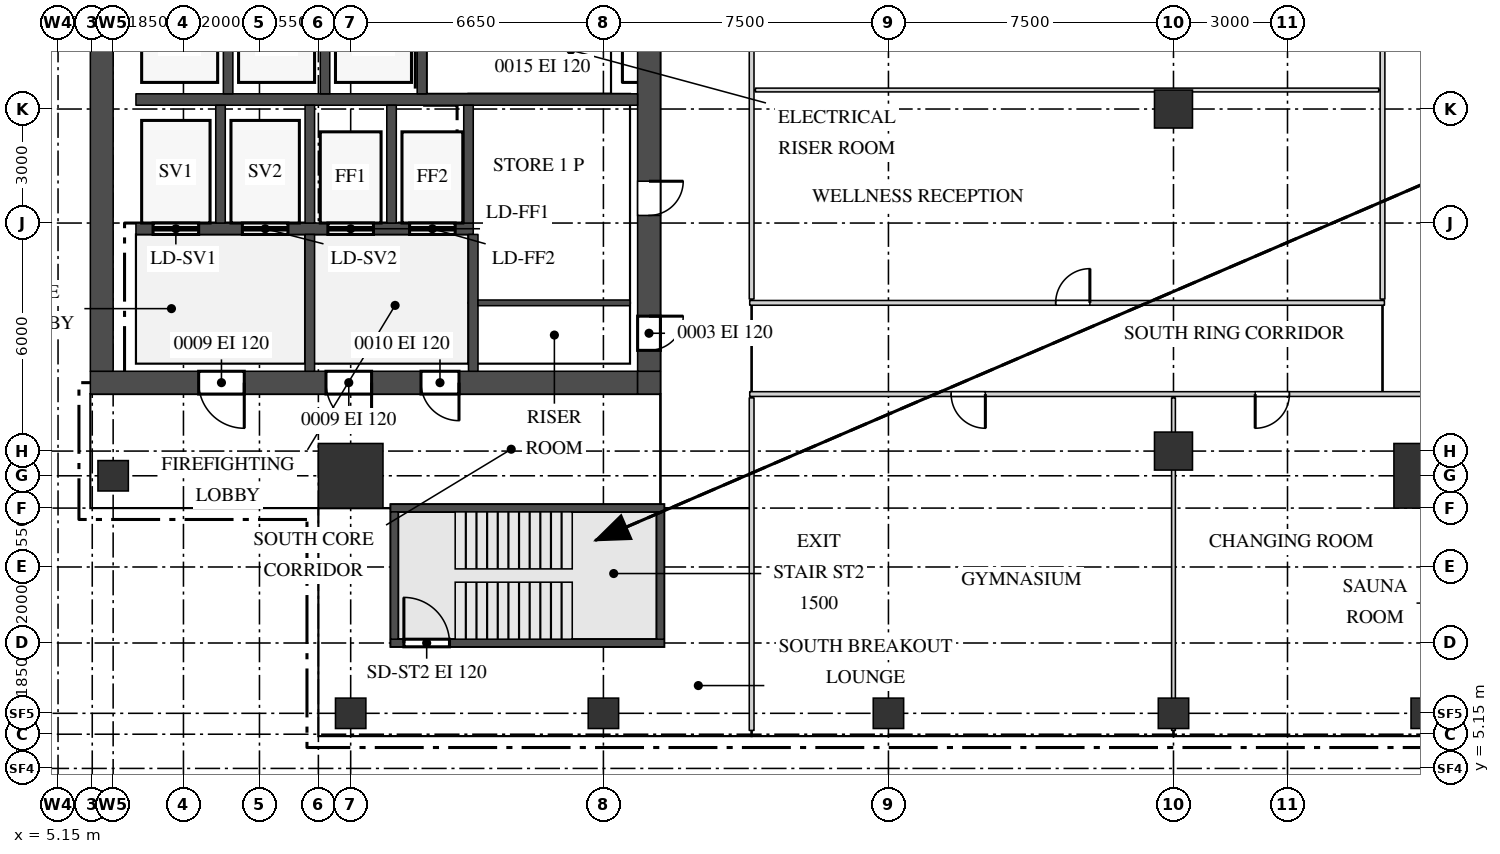
"""IFC4 building model, lengths in metres.
Left out: names, types, materials, properties, quantities, classifications, styles, units other than length and angle.
Written with IfcOpenShell. Run it as: python <this file> out.ifc"""

import sys

from ifc_helpers import new_model, si_unit, direction, frame, frame_2d, origin, origin_2d, place, context, subcontext, project, spatial, rectangle, extrude, source, transform, mapped, element, fill, save


model = new_model("IFC4")
c1 = context("Model", 3, precision=1e-05, world=origin(), true_north=direction((0.0, 1.0)))
c2 = subcontext(c1, "Body", "Model", "MODEL_VIEW")
j1 = project(units=[si_unit("LENGTHUNIT", "METRE"), si_unit("PLANEANGLEUNIT", "RADIAN")], contexts=[c1])
p1 = place(None, origin())
s1 = spatial("IfcSite", under=j1, at=p1, CompositionType="ELEMENT")
p2 = place(p1, origin())
s2 = spatial("IfcBuilding", under=s1, at=p2, CompositionType="ELEMENT")
p3 = place(p2, frame((0.0, 0.0, 298.2)))
s3 = spatial("IfcBuildingStorey", under=s2, at=p3, CompositionType="ELEMENT", Elevation=298.2)
m1 = source(origin(), c2, "Body", "SweptSolid", [
    extrude(rectangle(XDim=14.4, YDim=0.6, at=frame_2d((7.2, 0.0))), origin(), (0.0, 0.0, 1.0), 3.75),
])
p4 = place(p3, frame((6.0, 15.3, 0.0), z_axis=(0.0, 0.0, 1.0), x_axis=(1.0, 0.0, 0.0)))
e1 = element("IfcWall", 1, at=p4, inside=s3, PredefinedType="SHEAR", context=c2, shape_type="MappedRepresentation", body=[
    mapped(m1, transform((0.0, 0.0, 0.0))),
])
m2 = source(origin(), c2, "Body", "SweptSolid", [
    extrude(rectangle(XDim=1.2, YDim=2.1, at=frame_2d((0.6, 1.05))), frame((0.0, 0.31, 0.0), z_axis=(0.0, -1.0, 0.0), x_axis=(1.0, 0.0, 0.0)), (0.0, 0.0, 1.0), 0.62),
])
p5 = place(p4, frame((6.2, 0.0, 0.0)))
e2 = element("IfcOpeningElement", 2, at=p5, cuts=e1, PredefinedType="OPENING", context=c2, shape_type="MappedRepresentation", body=[
    mapped(m2, transform((0.0, 0.0, 0.0))),
])
p6 = place(p4, frame((2.85, 0.0, 0.0)))
e3 = element("IfcOpeningElement", 3, at=p6, cuts=e1, PredefinedType="OPENING", context=c2, shape_type="MappedRepresentation", body=[
    mapped(m2, transform((0.0, 0.0, 0.0))),
])
m3 = source(origin(), c2, "Body", "SweptSolid", [
    extrude(rectangle(XDim=1.0, YDim=2.1, at=frame_2d((0.5, 1.05))), frame((0.0, 0.31, 0.0), z_axis=(0.0, -1.0, 0.0), x_axis=(1.0, 0.0, 0.0)), (0.0, 0.0, 1.0), 0.62),
])
p7 = place(p4, frame((8.7, 0.0, 0.0)))
e4 = element("IfcOpeningElement", 4, at=p7, cuts=e1, PredefinedType="OPENING", context=c2, shape_type="MappedRepresentation", body=[
    mapped(m3, transform((0.0, 0.0, 0.0))),
])
m4 = source(origin(), c2, "Body", "SweptSolid", [
    extrude(rectangle(XDim=0.6, YDim=0.6, at=frame_2d((0.3, 0.0))), origin(), (0.0, 0.0, 1.0), 3.75),
])
p8 = place(p3, frame((20.4, 15.3, 0.0), z_axis=(0.0, 0.0, 1.0), x_axis=(1.0, 0.0, 0.0)))
e5 = element("IfcWall", 5, at=p8, inside=s3, PredefinedType="SHEAR", context=c2, shape_type="MappedRepresentation", body=[
    mapped(m4, transform((0.0, 0.0, 0.0))),
])
m5 = source(origin(), c2, "Body", "SweptSolid", [
    extrude(rectangle(XDim=22.8, YDim=0.6, at=frame_2d((11.4, 0.0))), origin(), (0.0, 0.0, 1.0), 3.75),
])
p9 = place(p3, frame((20.7, 15.6, 0.0), z_axis=(0.0, 0.0, 1.0), x_axis=(0.0, 1.0, 0.0)))
e6 = element("IfcWall", 6, at=p9, inside=s3, PredefinedType="SHEAR", context=c2, shape_type="MappedRepresentation", body=[
    mapped(m5, transform((0.0, 0.0, 0.0))),
])
m6 = source(origin(), c2, "Body", "SweptSolid", [
    extrude(rectangle(XDim=1.8, YDim=2.1, at=frame_2d((0.9, 1.05))), frame((0.0, 0.31, 0.0), z_axis=(0.0, -1.0, 0.0), x_axis=(1.0, 0.0, 0.0)), (0.0, 0.0, 1.0), 0.62),
])
p10 = place(p9, frame((10.9, 0.0, 0.0)))
e7 = element("IfcOpeningElement", 7, at=p10, cuts=e6, PredefinedType="OPENING", context=c2, shape_type="MappedRepresentation", body=[
    mapped(m6, transform((0.0, 0.0, 0.0))),
])
m7 = source(origin(), c2, "Body", "SweptSolid", [
    extrude(rectangle(XDim=0.9, YDim=2.1, at=frame_2d((0.45, 1.05))), frame((0.0, 0.31, 0.0), z_axis=(0.0, -1.0, 0.0), x_axis=(1.0, 0.0, 0.0)), (0.0, 0.0, 1.0), 0.62),
])
p11 = place(p9, frame((0.55, 0.0, 0.0)))
e8 = element("IfcOpeningElement", 8, at=p11, cuts=e6, PredefinedType="OPENING", context=c2, shape_type="MappedRepresentation", body=[
    mapped(m7, transform((0.0, 0.0, 0.0))),
])
p12 = place(p9, frame((4.1, 0.0, 0.0)))
e9 = element("IfcOpeningElement", 9, at=p12, cuts=e6, PredefinedType="OPENING", context=c2, shape_type="MappedRepresentation", body=[
    mapped(m7, transform((0.0, 0.0, 0.0))),
])
p13 = place(p3, frame((6.3, 15.6, 0.0), z_axis=(0.0, 0.0, 1.0), x_axis=(0.0, 1.0, 0.0)))
e10 = element("IfcWall", 10, at=p13, inside=s3, PredefinedType="SHEAR", context=c2, shape_type="MappedRepresentation", body=[
    mapped(m5, transform((0.0, 0.0, 0.0))),
])
m8 = source(origin(), c2, "Body", "SweptSolid", [
    extrude(rectangle(XDim=7.2, YDim=0.2, at=frame_2d((3.6, 0.0))), origin(), (0.0, 0.0, 1.0), 3.75),
])
p14 = place(p3, frame((13.9, 12.0, 0.0), z_axis=(0.0, 0.0, 1.0), x_axis=(1.0, 0.0, 0.0)))
e11 = element("IfcWall", 11, at=p14, inside=s3, PredefinedType="SHEAR", context=c2, shape_type="MappedRepresentation", body=[
    mapped(m8, transform((0.0, 0.0, 0.0))),
])
p15 = place(p3, frame((13.9, 8.45, 0.0), z_axis=(0.0, 0.0, 1.0), x_axis=(1.0, 0.0, 0.0)))
e12 = element("IfcWall", 12, at=p15, inside=s3, PredefinedType="SHEAR", context=c2, shape_type="MappedRepresentation", body=[
    mapped(m8, transform((0.0, 0.0, 0.0))),
])
m9 = source(origin(), c2, "Body", "SweptSolid", [
    extrude(rectangle(XDim=1.2, YDim=2.1, at=frame_2d((0.6, 1.05))), frame((0.0, 0.11, 0.0), z_axis=(0.0, -1.0, 0.0), x_axis=(1.0, 0.0, 0.0)), (0.0, 0.0, 1.0), 0.22),
])
p16 = place(p15, frame((0.35, 0.0, 0.0)))
e13 = element("IfcOpeningElement", 13, at=p16, cuts=e12, PredefinedType="OPENING", context=c2, shape_type="MappedRepresentation", body=[
    mapped(m9, transform((0.0, 0.0, 0.0))),
])
m10 = source(origin(), c2, "Body", "SweptSolid", [
    extrude(rectangle(XDim=3.35, YDim=0.2, at=frame_2d((1.675, 0.0))), origin(), (0.0, 0.0, 1.0), 3.75),
])
for number, where, z_axis, x_axis in (
    (14, (21.0, 8.55, 0.0), (0.0, 0.0, 1.0), (0.0, 1.0, 0.0)),
    (15, (14.0, 8.55, 0.0), (0.0, 0.0, 1.0), (0.0, 1.0, 0.0)),
):
    element("IfcWall", number, at=place(p3, frame(where, z_axis=z_axis, x_axis=x_axis)), inside=s3, PredefinedType="SHEAR", context=c2, shape_type="MappedRepresentation", body=[
        mapped(m10, transform((0.0, 0.0, 0.0))),
    ])
m11 = source(origin(), c2, "Body", "SweptSolid", [
    extrude(rectangle(XDim=13.2, YDim=0.3, at=frame_2d((6.6, 0.0))), origin(), (0.0, 0.0, 1.0), 3.75),
])
p17 = place(p3, frame((7.2, 22.75, 0.0), z_axis=(0.0, 0.0, 1.0), x_axis=(1.0, 0.0, 0.0)))
e16 = element("IfcWall", 16, at=p17, inside=s3, PredefinedType="STANDARD", context=c2, shape_type="MappedRepresentation", body=[
    mapped(m11, transform((0.0, 0.0, 0.0))),
])
m12 = source(origin(), c2, "Body", "SweptSolid", [
    extrude(rectangle(XDim=8.875, YDim=0.3, at=frame_2d((4.438, 0.0))), origin(), (0.0, 0.0, 1.0), 3.75),
])
p18 = place(p3, frame((7.2, 19.35, 0.0), z_axis=(0.0, 0.0, 1.0), x_axis=(1.0, 0.0, 0.0)))
e17 = element("IfcWall", 17, at=p18, inside=s3, PredefinedType="STANDARD", context=c2, shape_type="MappedRepresentation", body=[
    mapped(m12, transform((0.0, 0.0, 0.0))),
])
m13 = source(origin(), c2, "Body", "SweptSolid", [
    extrude(rectangle(XDim=1.2, YDim=2.1, at=frame_2d((0.6, 1.05))), frame((0.0, 0.16, 0.0), z_axis=(0.0, -1.0, 0.0), x_axis=(1.0, 0.0, 0.0)), (0.0, 0.0, 1.0), 0.32),
])
p19 = place(p18, frame((0.45, 0.0, 0.0)))
e18 = element("IfcOpeningElement", 18, at=p19, cuts=e17, PredefinedType="OPENING", context=c2, shape_type="MappedRepresentation", body=[
    mapped(m13, transform((0.0, 0.0, 0.0))),
])
p20 = place(p18, frame((2.8, 0.0, 0.0)))
e19 = element("IfcOpeningElement", 19, at=p20, cuts=e17, PredefinedType="OPENING", context=c2, shape_type="MappedRepresentation", body=[
    mapped(m13, transform((0.0, 0.0, 0.0))),
])
p21 = place(p18, frame((5.05, 0.0, 0.0)))
e20 = element("IfcOpeningElement", 20, at=p21, cuts=e17, PredefinedType="OPENING", context=c2, shape_type="MappedRepresentation", body=[
    mapped(m13, transform((0.0, 0.0, 0.0))),
])
p22 = place(p18, frame((7.2, 0.0, 0.0)))
e21 = element("IfcOpeningElement", 21, at=p22, cuts=e17, PredefinedType="OPENING", context=c2, shape_type="MappedRepresentation", body=[
    mapped(m13, transform((0.0, 0.0, 0.0))),
])
m14 = source(origin(), c2, "Body", "SweptSolid", [
    extrude(rectangle(XDim=3.1, YDim=0.25, at=frame_2d((1.55, 0.0))), origin(), (0.0, 0.0, 1.0), 3.75),
])
for number, where, z_axis, x_axis in (
    (22, (9.425, 19.5, 0.0), (0.0, 0.0, 1.0), (0.0, 1.0, 0.0)),
    (23, (11.775, 19.5, 0.0), (0.0, 0.0, 1.0), (0.0, 1.0, 0.0)),
    (24, (13.925, 19.5, 0.0), (0.0, 0.0, 1.0), (0.0, 1.0, 0.0)),
    (25, (15.95, 19.5, 0.0), (0.0, 0.0, 1.0), (0.0, 1.0, 0.0)),
):
    element("IfcWall", number, at=place(p3, frame(where, z_axis=z_axis, x_axis=x_axis)), inside=s3, PredefinedType="STANDARD", context=c2, shape_type="MappedRepresentation", body=[
        mapped(m14, transform((0.0, 0.0, 0.0))),
    ])
m15 = source(origin(), c2, "Body", "SweptSolid", [
    extrude(rectangle(XDim=2.4, YDim=0.25, at=frame_2d((1.2, 0.0))), origin(), (0.0, 0.0, 1.0), 3.75),
])
for number, where, z_axis, x_axis in (
    (26, (9.625, 22.9, 0.0), (0.0, 0.0, 1.0), (0.0, 1.0, 0.0)),
    (27, (12.175, 22.9, 0.0), (0.0, 0.0, 1.0), (0.0, 1.0, 0.0)),
    (28, (14.725, 22.9, 0.0), (0.0, 0.0, 1.0), (0.0, 1.0, 0.0)),
):
    element("IfcWall", number, at=place(p3, frame(where, z_axis=z_axis, x_axis=x_axis)), inside=s3, PredefinedType="STANDARD", context=c2, shape_type="MappedRepresentation", body=[
        mapped(m15, transform((0.0, 0.0, 0.0))),
    ])
m16 = source(origin(), c2, "Body", "SweptSolid", [
    extrude(rectangle(XDim=3.6, YDim=0.25, at=frame_2d((1.8, 0.0))), origin(), (0.0, 0.0, 1.0), 3.75),
])
for number, where, z_axis, x_axis in (
    (29, (16.075, 15.6, 0.0), (0.0, 0.0, 1.0), (0.0, 1.0, 0.0)),
    (30, (11.775, 15.6, 0.0), (0.0, 0.0, 1.0), (0.0, 1.0, 0.0)),
):
    element("IfcWall", number, at=place(p3, frame(where, z_axis=z_axis, x_axis=x_axis)), inside=s3, PredefinedType="STANDARD", context=c2, shape_type="MappedRepresentation", body=[
        mapped(m16, transform((0.0, 0.0, 0.0))),
    ])
m17 = source(origin(), c2, "Body", "SweptSolid", [
    extrude(rectangle(XDim=1.7, YDim=1.7, at=origin_2d()), origin(), (0.0, 0.0, 1.0), 3.75),
])
for number, where, z_axis, x_axis in (
    (31, (41.15, 12.85, 0.0), (0.0, 0.0, 1.0), (1.0, 0.0, 0.0)),
    (32, (12.85, 12.85, 0.0), (0.0, 0.0, 1.0), (1.0, 0.0, 0.0)),
):
    element("IfcColumn", number, at=place(p3, frame(where, z_axis=z_axis, x_axis=x_axis)), inside=s3, PredefinedType="COLUMN", context=c2, shape_type="MappedRepresentation", body=[
        mapped(m17, transform((0.0, 0.0, 0.0))),
    ])
m18 = source(origin(), c2, "Body", "SweptSolid", [
    extrude(rectangle(XDim=0.8, YDim=0.8, at=origin_2d()), origin(), (0.0, 0.0, 1.0), 3.75),
])
for number, where, z_axis, x_axis in (
    (33, (12.85, 6.6, 0.0), (0.0, 0.0, 1.0), (1.0, 0.0, 0.0)),
    (34, (19.5, 6.6, 0.0), (0.0, 0.0, 1.0), (1.0, 0.0, 0.0)),
    (35, (27.0, 6.6, 0.0), (0.0, 0.0, 1.0), (1.0, 0.0, 0.0)),
    (36, (34.5, 6.6, 0.0), (0.0, 0.0, 1.0), (1.0, 0.0, 0.0)),
    (37, (41.15, 6.6, 0.0), (0.0, 0.0, 1.0), (1.0, 0.0, 0.0)),
    (38, (6.6, 12.85, 0.0), (0.0, 0.0, 1.0), (1.0, 0.0, 0.0)),
):
    element("IfcColumn", number, at=place(p3, frame(where, z_axis=z_axis, x_axis=x_axis)), inside=s3, PredefinedType="COLUMN", context=c2, shape_type="MappedRepresentation", body=[
        mapped(m18, transform((0.0, 0.0, 0.0))),
    ])
m19 = source(origin(), c2, "Body", "SweptSolid", [
    extrude(rectangle(XDim=1.0, YDim=1.0, at=origin_2d()), origin(), (0.0, 0.0, 1.0), 3.75),
])
for number, where, z_axis, x_axis in (
    (39, (34.5, 13.5, 0.0), (0.0, 0.0, 1.0), (1.0, 0.0, 0.0)),
    (40, (34.5, 22.5, 0.0), (0.0, 0.0, 1.0), (1.0, 0.0, 0.0)),
):
    element("IfcColumn", number, at=place(p3, frame(where, z_axis=z_axis, x_axis=x_axis)), inside=s3, PredefinedType="COLUMN", context=c2, shape_type="MappedRepresentation", body=[
        mapped(m19, transform((0.0, 0.0, 0.0))),
    ])
m20 = source(origin(), c2, "Body", "SweptSolid", [
    extrude(rectangle(XDim=8.75, YDim=0.125, at=frame_2d((4.375, 0.0))), origin(), (0.0, 0.0, 1.0), 3.8),
])
p23 = place(p3, frame((23.4, 6.15, 0.0), z_axis=(0.0, 0.0, 1.0), x_axis=(0.0, 1.0, 0.0)))
e41 = element("IfcWall", 41, at=p23, inside=s3, PredefinedType="PARTITIONING", context=c2, shape_type="MappedRepresentation", body=[
    mapped(m20, transform((0.0, 0.0, 0.0))),
])
m21 = source(origin(), c2, "Body", "SweptSolid", [
    extrude(rectangle(XDim=8.75, YDim=0.1, at=frame_2d((4.375, 0.0))), origin(), (0.0, 0.0, 1.0), 3.35),
])
p24 = place(p3, frame((34.5, 6.15, 0.0), z_axis=(0.0, 0.0, 1.0), x_axis=(0.0, 1.0, 0.0)))
e42 = element("IfcWall", 42, at=p24, inside=s3, PredefinedType="PARTITIONING", context=c2, shape_type="MappedRepresentation", body=[
    mapped(m21, transform((0.0, 0.0, 0.0))),
])
m22 = source(origin(), c2, "Body", "SweptSolid", [
    extrude(rectangle(XDim=19.1, YDim=0.125, at=frame_2d((9.55, 0.0))), origin(), (0.0, 0.0, 1.0), 3.8),
])
p25 = place(p3, frame((23.35, 15.0, 0.0), z_axis=(0.0, 0.0, 1.0), x_axis=(1.0, 0.0, 0.0)))
e43 = element("IfcWall", 43, at=p25, inside=s3, PredefinedType="PARTITIONING", context=c2, shape_type="MappedRepresentation", body=[
    mapped(m22, transform((0.0, 0.0, 0.0))),
])
m23 = source(origin(), c2, "Body", "SweptSolid", [
    extrude(rectangle(XDim=0.9, YDim=2.1, at=frame_2d((0.45, 1.05))), frame((0.0, 0.073, 0.0), z_axis=(0.0, -1.0, 0.0), x_axis=(1.0, 0.0, 0.0)), (0.0, 0.0, 1.0), 0.145),
])
p26 = place(p25, frame((5.3, 0.0, 0.0)))
e44 = element("IfcOpeningElement", 44, at=p26, cuts=e43, PredefinedType="OPENING", context=c2, shape_type="MappedRepresentation", body=[
    mapped(m23, transform((0.0, 0.0, 0.0))),
])
p27 = place(p25, frame((13.3, 0.0, 0.0)))
e45 = element("IfcOpeningElement", 45, at=p27, cuts=e43, PredefinedType="OPENING", context=c2, shape_type="MappedRepresentation", body=[
    mapped(m23, transform((0.0, 0.0, 0.0))),
])
p28 = place(p25, frame((17.95, 0.0, 0.0)))
e46 = element("IfcOpeningElement", 46, at=p28, cuts=e43, PredefinedType="OPENING", context=c2, shape_type="MappedRepresentation", body=[
    mapped(m23, transform((0.0, 0.0, 0.0))),
])
m24 = source(origin(), c2, "Body", "SweptSolid", [
    extrude(rectangle(XDim=4.0, YDim=0.15, at=frame_2d((2.0, 0.0))), origin(), (0.0, 0.0, 1.0), 3.8),
])
p29 = place(p3, frame((16.2, 17.4, 0.0), z_axis=(0.0, 0.0, 1.0), x_axis=(1.0, 0.0, 0.0)))
e47 = element("IfcWall", 47, at=p29, inside=s3, PredefinedType="PARTITIONING", context=c2, shape_type="MappedRepresentation", body=[
    mapped(m24, transform((0.0, 0.0, 0.0))),
])
m25 = source(origin(), c2, "Body", "SweptSolid", [
    extrude(rectangle(XDim=16.7, YDim=0.125, at=frame_2d((8.35, 0.0))), origin(), (0.0, 0.0, 1.0), 3.8),
])
p30 = place(p3, frame((23.35, 17.4, 0.0), z_axis=(0.0, 0.0, 1.0), x_axis=(1.0, 0.0, 0.0)))
e48 = element("IfcWall", 48, at=p30, inside=s3, PredefinedType="PARTITIONING", context=c2, shape_type="MappedRepresentation", body=[
    mapped(m25, transform((0.0, 0.0, 0.0))),
])
p31 = place(p30, frame((8.05, 0.0, 0.0)))
e49 = element("IfcOpeningElement", 49, at=p31, cuts=e48, PredefinedType="OPENING", context=c2, shape_type="MappedRepresentation", body=[
    mapped(m23, transform((0.0, 0.0, 0.0))),
])
m26 = source(origin(), c2, "Body", "SweptSolid", [
    extrude(rectangle(XDim=19.0, YDim=0.125, at=frame_2d((9.5, 0.0))), origin(), (0.0, 0.0, 1.0), 3.8),
])
p32 = place(p3, frame((23.4, 17.5, 0.0), z_axis=(0.0, 0.0, 1.0), x_axis=(0.0, 1.0, 0.0)))
e50 = element("IfcWall", 50, at=p32, inside=s3, PredefinedType="PARTITIONING", context=c2, shape_type="MappedRepresentation", body=[
    mapped(m26, transform((0.0, 0.0, 0.0))),
])
p33 = place(p32, frame((8.4, 0.0, 0.0)))
e51 = element("IfcOpeningElement", 51, at=p33, cuts=e50, PredefinedType="OPENING", context=c2, shape_type="MappedRepresentation", body=[
    mapped(m23, transform((0.0, 0.0, 0.0))),
])
p34 = place(p3, frame((40.0, 17.5, 0.0), z_axis=(0.0, 0.0, 1.0), x_axis=(0.0, 1.0, 0.0)))
e52 = element("IfcWall", 52, at=p34, inside=s3, PredefinedType="PARTITIONING", context=c2, shape_type="MappedRepresentation", body=[
    mapped(m26, transform((0.0, 0.0, 0.0))),
])
m27 = source(origin(), c2, "Body", "SweptSolid", [
    extrude(rectangle(XDim=16.4, YDim=0.1, at=frame_2d((8.2, 0.0))), origin(), (0.0, 0.0, 1.0), 3.8),
])
p35 = place(p3, frame((23.5, 23.0, 0.0), z_axis=(0.0, 0.0, 1.0), x_axis=(1.0, 0.0, 0.0)))
e53 = element("IfcWall", 53, at=p35, inside=s3, PredefinedType="PARTITIONING", context=c2, shape_type="MappedRepresentation", body=[
    mapped(m27, transform((0.0, 0.0, 0.0))),
])
m28 = source(origin(), c2, "Body", "SweptSolid", [
    extrude(rectangle(XDim=0.9, YDim=2.1, at=frame_2d((0.45, 1.05))), frame((0.0, 0.25, 0.0), z_axis=(0.0, -1.0, 0.0), x_axis=(1.0, 0.0, 0.0)), (0.0, 0.0, 1.0), 0.5),
])
p36 = place(p11, origin())
e54 = element("IfcDoor", 54, at=p36, inside=s3, OperationType="SINGLE_SWING_RIGHT", PredefinedType="DOOR", context=c2, shape_type="MappedRepresentation", body=[
    mapped(m28, transform((0.0, 0.0, 0.0))),
])
fill(e8, e54)
p37 = place(p12, origin())
e55 = element("IfcDoor", 55, at=p37, inside=s3, OperationType="SINGLE_SWING_RIGHT", PredefinedType="DOOR", context=c2, shape_type="MappedRepresentation", body=[
    mapped(m28, transform((0.0, 0.0, 0.0))),
])
fill(e9, e55)
m29 = source(origin(), c2, "Body", "SweptSolid", [
    extrude(rectangle(XDim=1.2, YDim=2.1, at=frame_2d((0.6, 1.05))), frame((0.0, 0.25, 0.0), z_axis=(0.0, -1.0, 0.0), x_axis=(1.0, 0.0, 0.0)), (0.0, 0.0, 1.0), 0.5),
])
p38 = place(p5, origin())
e56 = element("IfcDoor", 56, at=p38, inside=s3, OperationType="SINGLE_SWING_RIGHT", PredefinedType="DOOR", context=c2, shape_type="MappedRepresentation", body=[
    mapped(m29, transform((0.0, 0.0, 0.0))),
])
fill(e2, e56)
p39 = place(p6, origin())
e57 = element("IfcDoor", 57, at=p39, inside=s3, OperationType="SINGLE_SWING_RIGHT", PredefinedType="DOOR", context=c2, shape_type="MappedRepresentation", body=[
    mapped(m29, transform((0.0, 0.0, 0.0))),
])
fill(e3, e57)
m30 = source(origin(), c2, "Body", "SweptSolid", [
    extrude(rectangle(XDim=1.0, YDim=2.1, at=frame_2d((0.5, 1.05))), frame((0.0, 0.25, 0.0), z_axis=(0.0, -1.0, 0.0), x_axis=(1.0, 0.0, 0.0)), (0.0, 0.0, 1.0), 0.5),
])
p40 = place(p7, origin())
e58 = element("IfcDoor", 58, at=p40, inside=s3, OperationType="SINGLE_SWING_RIGHT", PredefinedType="DOOR", context=c2, shape_type="MappedRepresentation", body=[
    mapped(m30, transform((0.0, 0.0, 0.0))),
])
fill(e4, e58)
m31 = source(origin(), c2, "Body", "SweptSolid", [
    extrude(rectangle(XDim=0.9, YDim=2.1, at=frame_2d((0.45, 1.05))), frame((0.0, 0.025, 0.0), z_axis=(0.0, -1.0, 0.0), x_axis=(1.0, 0.0, 0.0)), (0.0, 0.0, 1.0), 0.05),
])
p41 = place(p26, origin())
e59 = element("IfcDoor", 59, at=p41, inside=s3, OperationType="SINGLE_SWING_RIGHT", PredefinedType="DOOR", context=c2, shape_type="MappedRepresentation", body=[
    mapped(m31, transform((0.0, 0.0, 0.0))),
])
fill(e44, e59)
p42 = place(p27, origin())
e60 = element("IfcDoor", 60, at=p42, inside=s3, OperationType="SINGLE_SWING_LEFT", PredefinedType="DOOR", context=c2, shape_type="MappedRepresentation", body=[
    mapped(m31, transform((0.0, 0.0, 0.0))),
])
fill(e45, e60)
p43 = place(p31, origin())
e61 = element("IfcDoor", 61, at=p43, inside=s3, OperationType="SINGLE_SWING_LEFT", PredefinedType="DOOR", context=c2, shape_type="MappedRepresentation", body=[
    mapped(m31, transform((0.0, 0.0, 0.0))),
])
fill(e49, e61)
m32 = source(origin(), c2, "Body", "SweptSolid", [
    extrude(rectangle(XDim=1.2, YDim=2.1, at=frame_2d((0.6, 1.05))), frame((0.0, 0.025, 0.0), z_axis=(0.0, -1.0, 0.0), x_axis=(1.0, 0.0, 0.0)), (0.0, 0.0, 1.0), 0.05),
])
p44 = place(p16, origin())
e62 = element("IfcDoor", 62, at=p44, inside=s3, OperationType="SINGLE_SWING_RIGHT", PredefinedType="DOOR", context=c2, shape_type="MappedRepresentation", body=[
    mapped(m32, transform((0.0, 0.0, 0.0))),
])
fill(e13, e62)
p45 = place(p19, origin())
e63 = element("IfcDoor", 63, at=p45, inside=s3, OperationType="DOUBLE_DOOR_SLIDING", PredefinedType="DOOR", context=c2, shape_type="MappedRepresentation", body=[
    mapped(m32, transform((0.0, 0.0, 0.0))),
])
fill(e18, e63)
p46 = place(p20, origin())
e64 = element("IfcDoor", 64, at=p46, inside=s3, OperationType="DOUBLE_DOOR_SLIDING", PredefinedType="DOOR", context=c2, shape_type="MappedRepresentation", body=[
    mapped(m32, transform((0.0, 0.0, 0.0))),
])
fill(e19, e64)
p47 = place(p21, origin())
e65 = element("IfcDoor", 65, at=p47, inside=s3, OperationType="DOUBLE_DOOR_SLIDING", PredefinedType="DOOR", context=c2, shape_type="MappedRepresentation", body=[
    mapped(m32, transform((0.0, 0.0, 0.0))),
])
fill(e20, e65)
p48 = place(p22, origin())
e66 = element("IfcDoor", 66, at=p48, inside=s3, OperationType="DOUBLE_DOOR_SLIDING", PredefinedType="DOOR", context=c2, shape_type="MappedRepresentation", body=[
    mapped(m32, transform((0.0, 0.0, 0.0))),
])
fill(e21, e66)
save(model, sys.argv[1])
